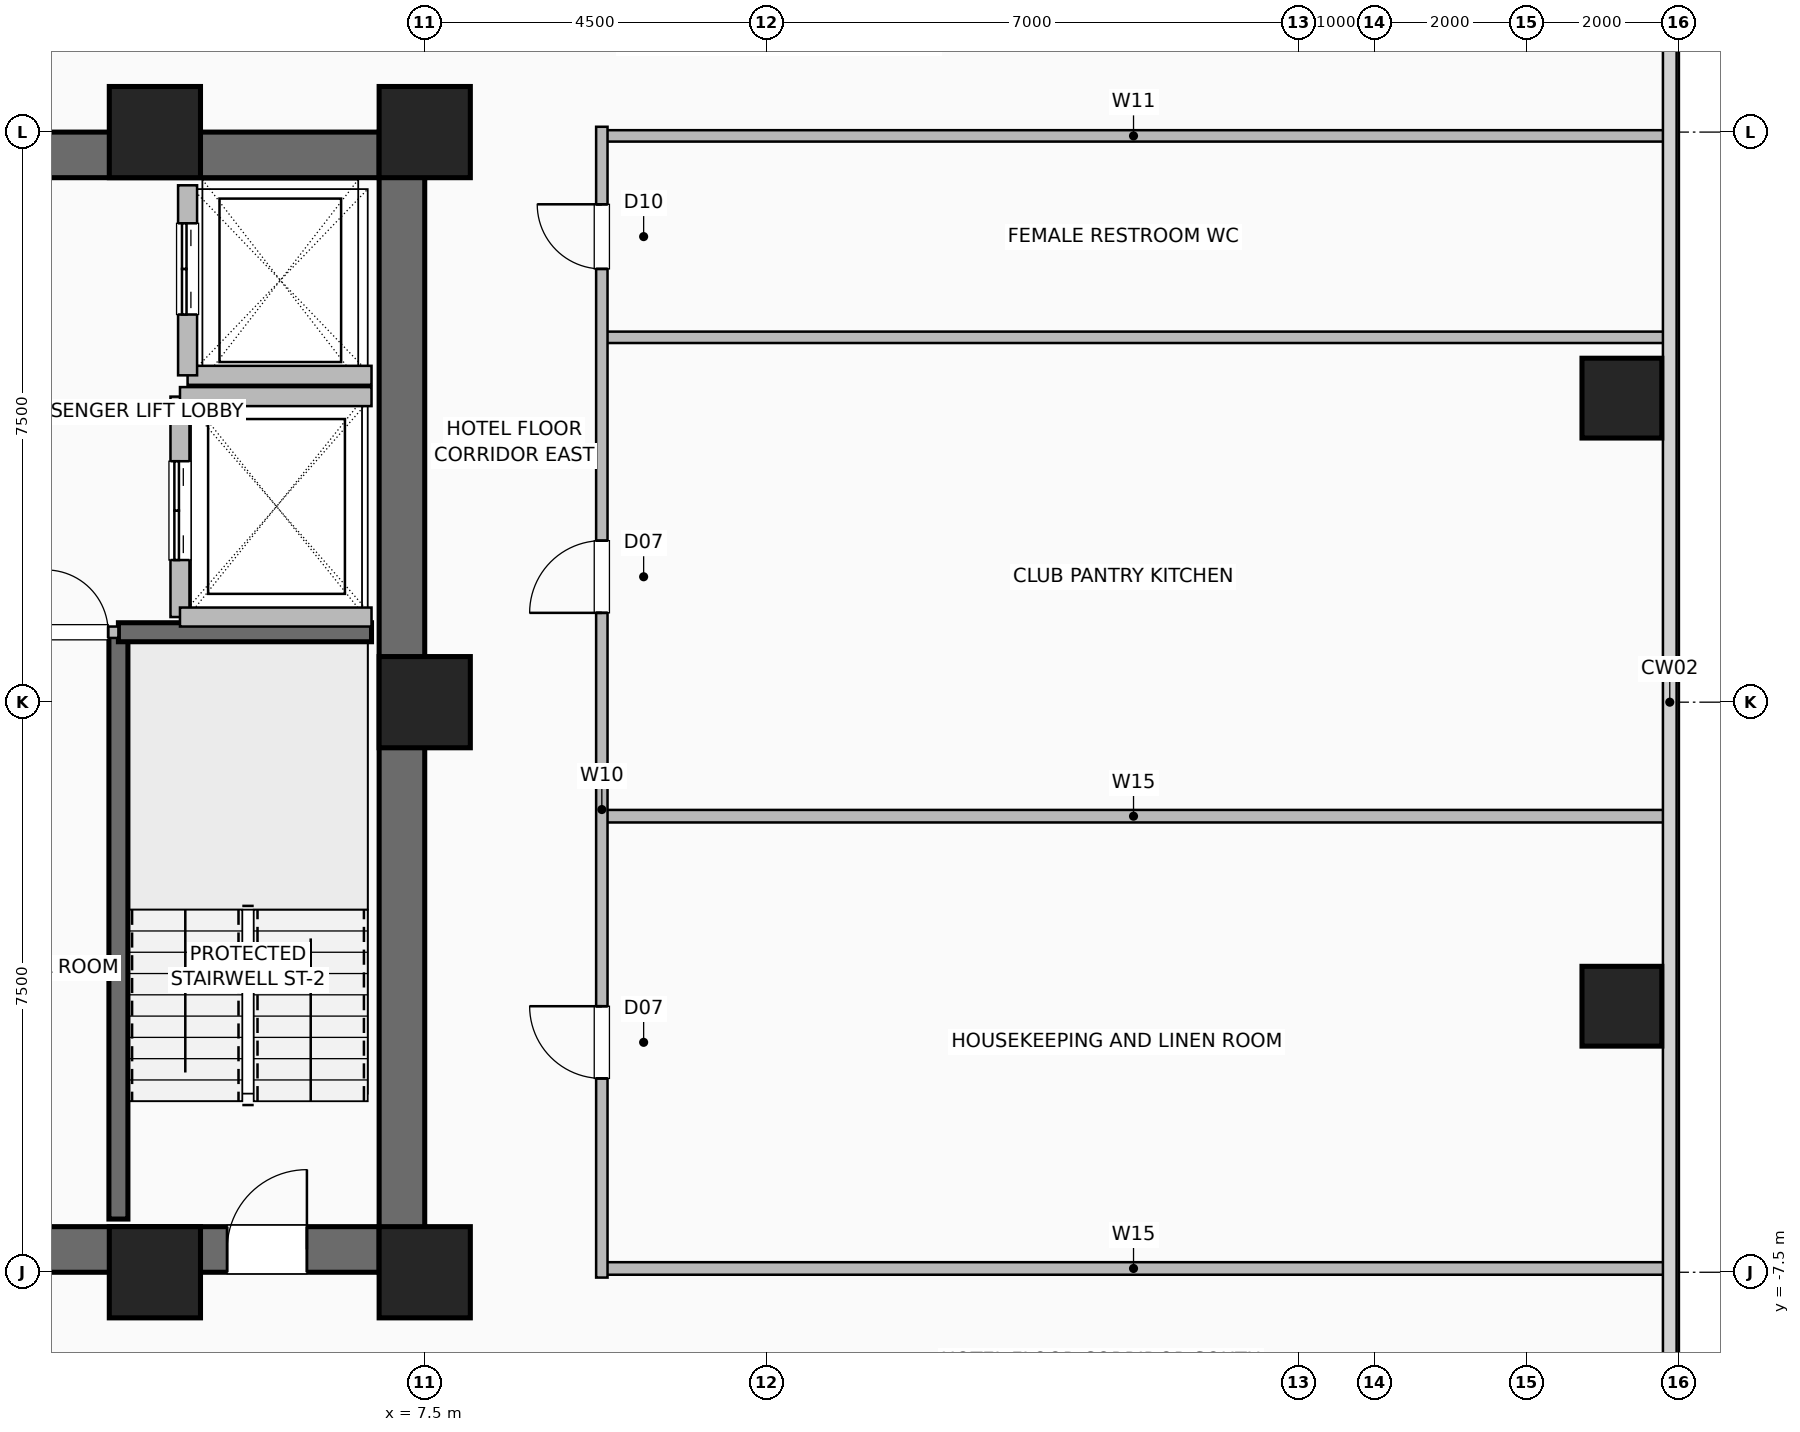
"""IFC4 building model, lengths in metres.
Left out: names, types, materials, properties, quantities, classifications, styles, units other than length and angle.
Written with IfcOpenShell. Run it as: python <this file> out.ifc"""

import sys

from ifc_helpers import new_model, si_unit, direction, frame, frame_2d, origin, origin_2d, place, context, subcontext, project, spatial, rectangle, hollow_rectangle, extrude, element, fill, save


model = new_model("IFC4")
c1 = context("Model", 3, precision=1e-05, world=origin(), true_north=direction((0.0, 1.0)))
c2 = subcontext(c1, "Body", "Model", "MODEL_VIEW")
j1 = project(units=[si_unit("LENGTHUNIT", "METRE"), si_unit("PLANEANGLEUNIT", "RADIAN")], contexts=[c1])
p1 = place(None, origin())
s1 = spatial("IfcSite", under=j1, at=p1, CompositionType="ELEMENT")
p2 = place(p1, origin())
s2 = spatial("IfcBuilding", under=s1, at=p2, CompositionType="ELEMENT")
p3 = place(p2, frame((0.0, 0.0, 65.5)))
s3 = spatial("IfcBuildingStorey", under=s2, at=p3, CompositionType="ELEMENT", Elevation=65.5)
for number, where, z_axis, x_axis in (
    (1, (3.95, -7.5, 0.0), (0.0, 0.0, 1.0), (1.0, 0.0, 0.0)),
    (2, (7.5, -7.5, 0.0), (0.0, 0.0, 1.0), (1.0, 0.0, 0.0)),
    (3, (7.5, 0.0, 0.0), (0.0, 0.0, 1.0), (1.0, 0.0, 0.0)),
    (4, (7.5, 7.5, 0.0), (0.0, 0.0, 1.0), (1.0, 0.0, 0.0)),
    (5, (3.95, 7.5, 0.0), (0.0, 0.0, 1.0), (1.0, 0.0, 0.0)),
):
    element("IfcColumn", number, at=place(p3, frame(where, z_axis=z_axis, x_axis=x_axis)), inside=s3, PredefinedType="COLUMN", context=c2, shape_type="SweptSolid", body=[
        extrude(hollow_rectangle(XDim=1.2, YDim=1.2, WallThickness=0.055, at=origin_2d()), origin(), (0.0, 0.0, 1.0), 3.5),
    ])
for number, where, z_axis, x_axis in (
    (6, (23.25, -4.0, 0.0), (0.0, 0.0, 1.0), (1.0, 0.0, 0.0)),
    (7, (23.25, 4.0, 0.0), (0.0, 0.0, 1.0), (1.0, 0.0, 0.0)),
):
    element("IfcColumn", number, at=place(p3, frame(where, z_axis=z_axis, x_axis=x_axis)), inside=s3, PredefinedType="COLUMN", context=c2, shape_type="SweptSolid", body=[
        extrude(hollow_rectangle(XDim=1.05, YDim=1.05, WallThickness=0.05, at=origin_2d()), origin(), (0.0, 0.0, 1.0), 3.5),
    ])
p4 = place(p3, frame((-7.5, -7.2, 0.0), z_axis=(0.0, 0.0, 1.0), x_axis=(1.0, 0.0, 0.0)))
e8 = element("IfcWall", 8, at=p4, inside=s3, PredefinedType="SHEAR", context=c2, shape_type="SweptSolid", body=[
    extrude(rectangle(XDim=15.0, YDim=0.6, at=frame_2d((7.5, 0.0))), origin(), (0.0, 0.0, 1.0), 3.25),
])
p5 = place(p4, frame((1.55, 0.0, 0.0)))
e9 = element("IfcOpeningElement", 9, at=p5, cuts=e8, PredefinedType="OPENING", context=c2, shape_type="SweptSolid", body=[
    extrude(rectangle(XDim=1.05, YDim=2.08, at=frame_2d((0.525, 1.04))), frame((0.0, 0.31, 0.0), z_axis=(0.0, -1.0, 0.0), x_axis=(1.0, 0.0, 0.0)), (0.0, 0.0, 1.0), 0.62),
])
p6 = place(p4, frame((12.4, 0.0, 0.0)))
e10 = element("IfcOpeningElement", 10, at=p6, cuts=e8, PredefinedType="OPENING", context=c2, shape_type="SweptSolid", body=[
    extrude(rectangle(XDim=1.05, YDim=2.08, at=frame_2d((0.525, 1.04))), frame((0.0, 0.31, 0.0), z_axis=(0.0, -1.0, 0.0), x_axis=(1.0, 0.0, 0.0)), (0.0, 0.0, 1.0), 0.62),
])
p7 = place(p4, frame((4.64, 0.0, 0.0)))
e11 = element("IfcOpeningElement", 11, at=p7, cuts=e8, PredefinedType="OPENING", context=c2, shape_type="SweptSolid", body=[
    extrude(rectangle(XDim=1.1, YDim=2.2, at=frame_2d((0.55, 1.1))), frame((0.0, 0.31, 0.0), z_axis=(0.0, -1.0, 0.0), x_axis=(1.0, 0.0, 0.0)), (0.0, 0.0, 1.0), 0.62),
])
p8 = place(p4, frame((6.52, 0.0, 0.0)))
e12 = element("IfcOpeningElement", 12, at=p8, cuts=e8, PredefinedType="OPENING", context=c2, shape_type="SweptSolid", body=[
    extrude(rectangle(XDim=1.1, YDim=2.2, at=frame_2d((0.55, 1.1))), frame((0.0, 0.31, 0.0), z_axis=(0.0, -1.0, 0.0), x_axis=(1.0, 0.0, 0.0)), (0.0, 0.0, 1.0), 0.62),
])
p9 = place(p4, frame((8.4, 0.0, 0.0)))
e13 = element("IfcOpeningElement", 13, at=p9, cuts=e8, PredefinedType="OPENING", context=c2, shape_type="SweptSolid", body=[
    extrude(rectangle(XDim=1.1, YDim=2.2, at=frame_2d((0.55, 1.1))), frame((0.0, 0.31, 0.0), z_axis=(0.0, -1.0, 0.0), x_axis=(1.0, 0.0, 0.0)), (0.0, 0.0, 1.0), 0.62),
])
for number, where, z_axis, x_axis in (
    (14, (-7.5, 7.2, 0.0), (0.0, 0.0, 1.0), (1.0, 0.0, 0.0)),
    (15, (7.2, -7.5, 0.0), (0.0, 0.0, 1.0), (0.0, 1.0, 0.0)),
):
    element("IfcWall", number, at=place(p3, frame(where, z_axis=z_axis, x_axis=x_axis)), inside=s3, PredefinedType="SHEAR", context=c2, shape_type="SweptSolid", body=[
        extrude(rectangle(XDim=15.0, YDim=0.6, at=frame_2d((7.5, 0.0))), origin(), (0.0, 0.0, 1.0), 3.25),
    ])
p10 = place(p3, frame((3.47, -6.8, 0.0), z_axis=(0.0, 0.0, 1.0), x_axis=(0.0, 1.0, 0.0)))
e16 = element("IfcWall", 16, at=p10, inside=s3, PredefinedType="SHEAR", context=c2, shape_type="SweptSolid", body=[
    extrude(rectangle(XDim=7.72, YDim=0.25, at=frame_2d((3.86, 0.0))), origin(), (0.0, 0.0, 1.0), 3.25),
])
p11 = place(p3, frame((3.47, 0.92, 0.0), z_axis=(0.0, 0.0, 1.0), x_axis=(1.0, 0.0, 0.0)))
e17 = element("IfcWall", 17, at=p11, inside=s3, PredefinedType="SHEAR", context=c2, shape_type="SweptSolid", body=[
    extrude(rectangle(XDim=3.33, YDim=0.25, at=frame_2d((1.665, 0.0))), origin(), (0.0, 0.0, 1.0), 3.25),
])
p12 = place(p3, frame((4.38, 4.3, 0.0), z_axis=(0.0, 0.0, 1.0), x_axis=(1.0, 0.0, 0.0)))
e18 = element("IfcWall", 18, at=p12, inside=s3, PredefinedType="SHEAR", context=c2, shape_type="SweptSolid", body=[
    extrude(rectangle(XDim=2.42, YDim=0.25, at=frame_2d((1.21, 0.0))), origin(), (0.0, 0.0, 1.0), 3.25),
])
p13 = place(p3, frame((4.38, 4.3, 0.0), z_axis=(0.0, 0.0, 1.0), x_axis=(0.0, 1.0, 0.0)))
e19 = element("IfcWall", 19, at=p13, inside=s3, PredefinedType="SHEAR", context=c2, shape_type="SweptSolid", body=[
    extrude(rectangle(XDim=2.5, YDim=0.25, at=frame_2d((1.25, 0.0))), origin(), (0.0, 0.0, 1.0), 3.25),
])
p14 = place(p13, frame((0.8, 0.0, 0.0)))
e20 = element("IfcOpeningElement", 20, at=p14, cuts=e19, PredefinedType="OPENING", context=c2, shape_type="SweptSolid", body=[
    extrude(rectangle(XDim=1.2, YDim=2.2, at=frame_2d((0.6, 1.1))), frame((0.0, 0.135, 0.0), z_axis=(0.0, -1.0, 0.0), x_axis=(1.0, 0.0, 0.0)), (0.0, 0.0, 1.0), 0.27),
])
p15 = place(p3, frame((4.28, 1.12, 0.0), z_axis=(0.0, 0.0, 1.0), x_axis=(0.0, 1.0, 0.0)))
e21 = element("IfcWall", 21, at=p15, inside=s3, PredefinedType="SHEAR", context=c2, shape_type="SweptSolid", body=[
    extrude(rectangle(XDim=2.9, YDim=0.25, at=frame_2d((1.45, 0.0))), origin(), (0.0, 0.0, 1.0), 3.25),
])
p16 = place(p15, frame((0.75, 0.0, 0.0)))
e22 = element("IfcOpeningElement", 22, at=p16, cuts=e21, PredefinedType="OPENING", context=c2, shape_type="SweptSolid", body=[
    extrude(rectangle(XDim=1.3, YDim=2.3, at=frame_2d((0.65, 1.15))), frame((0.0, 0.135, 0.0), z_axis=(0.0, -1.0, 0.0), x_axis=(1.0, 0.0, 0.0)), (0.0, 0.0, 1.0), 0.27),
])
for number, where, z_axis, x_axis in (
    (23, (4.28, 1.12, 0.0), (0.0, 0.0, 1.0), (1.0, 0.0, 0.0)),
    (24, (4.28, 4.02, 0.0), (0.0, 0.0, 1.0), (1.0, 0.0, 0.0)),
):
    element("IfcWall", number, at=place(p3, frame(where, z_axis=z_axis, x_axis=x_axis)), inside=s3, PredefinedType="SHEAR", context=c2, shape_type="SweptSolid", body=[
        extrude(rectangle(XDim=2.52, YDim=0.25, at=frame_2d((1.26, 0.0))), origin(), (0.0, 0.0, 1.0), 3.25),
    ])
p17 = place(p3, frame((2.38, 0.92, 0.0), z_axis=(0.0, 0.0, 1.0), x_axis=(1.0, 0.0, 0.0)))
e25 = element("IfcWall", 25, at=p17, inside=s3, PredefinedType="PARTITIONING", context=c2, shape_type="SweptSolid", body=[
    extrude(rectangle(XDim=1.09, YDim=0.15, at=frame_2d((0.545, 0.0))), origin(), (0.0, 0.0, 1.0), 3.25),
])
p18 = place(p17, frame((0.135, 0.0, 0.0)))
e26 = element("IfcOpeningElement", 26, at=p18, cuts=e25, PredefinedType="OPENING", context=c2, shape_type="SweptSolid", body=[
    extrude(rectangle(XDim=0.82, YDim=2.05, at=frame_2d((0.41, 1.025))), frame((0.0, 0.085, 0.0), z_axis=(0.0, -1.0, 0.0), x_axis=(1.0, 0.0, 0.0)), (0.0, 0.0, 1.0), 0.17),
])
for number, where, z_axis, x_axis in (
    (27, (9.83, -7.45, 0.0), (0.0, 0.0, 1.0), (1.0, 0.0, 0.0)),
    (28, (9.83, -1.5, 0.0), (0.0, 0.0, 1.0), (1.0, 0.0, 0.0)),
):
    element("IfcWall", number, at=place(p3, frame(where, z_axis=z_axis, x_axis=x_axis)), inside=s3, PredefinedType="PLUMBINGWALL", context=c2, shape_type="SweptSolid", body=[
        extrude(rectangle(XDim=13.99, YDim=0.165, at=frame_2d((6.995, 0.0))), origin(), (0.0, 0.0, 1.0), 3.25),
    ])
p19 = place(p3, frame((9.83, 4.8, 0.0), z_axis=(0.0, 0.0, 1.0), x_axis=(1.0, 0.0, 0.0)))
e29 = element("IfcWall", 29, at=p19, inside=s3, PredefinedType="PARTITIONING", context=c2, shape_type="SweptSolid", body=[
    extrude(rectangle(XDim=13.99, YDim=0.15, at=frame_2d((6.995, 0.0))), origin(), (0.0, 0.0, 1.0), 2.818),
])
p20 = place(p3, frame((9.83, 7.45, 0.0), z_axis=(0.0, 0.0, 1.0), x_axis=(1.0, 0.0, 0.0)))
e30 = element("IfcWall", 30, at=p20, inside=s3, PredefinedType="PARTITIONING", context=c2, shape_type="SweptSolid", body=[
    extrude(rectangle(XDim=13.99, YDim=0.15, at=frame_2d((6.995, 0.0))), origin(), (0.0, 0.0, 1.0), 3.25),
])
p21 = place(p3, frame((9.83, -7.57, 0.0), z_axis=(0.0, 0.0, 1.0), x_axis=(0.0, 1.0, 0.0)))
e31 = element("IfcWall", 31, at=p21, inside=s3, PredefinedType="PARTITIONING", context=c2, shape_type="SweptSolid", body=[
    extrude(rectangle(XDim=15.14, YDim=0.15, at=frame_2d((7.57, 0.0))), origin(), (0.0, 0.0, 1.0), 3.25),
])
p22 = place(p21, frame((2.62, 0.0, 0.0)))
e32 = element("IfcOpeningElement", 32, at=p22, cuts=e31, PredefinedType="OPENING", context=c2, shape_type="SweptSolid", body=[
    extrude(rectangle(XDim=0.95, YDim=2.06, at=frame_2d((0.475, 1.03))), frame((0.0, 0.085, 0.0), z_axis=(0.0, -1.0, 0.0), x_axis=(1.0, 0.0, 0.0)), (0.0, 0.0, 1.0), 0.17),
])
p23 = place(p21, frame((8.745, 0.0, 0.0)))
e33 = element("IfcOpeningElement", 33, at=p23, cuts=e31, PredefinedType="OPENING", context=c2, shape_type="SweptSolid", body=[
    extrude(rectangle(XDim=0.95, YDim=2.06, at=frame_2d((0.475, 1.03))), frame((0.0, 0.085, 0.0), z_axis=(0.0, -1.0, 0.0), x_axis=(1.0, 0.0, 0.0)), (0.0, 0.0, 1.0), 0.17),
])
p24 = place(p21, frame((13.27, 0.0, 0.0)))
e34 = element("IfcOpeningElement", 34, at=p24, cuts=e31, PredefinedType="OPENING", context=c2, shape_type="SweptSolid", body=[
    extrude(rectangle(XDim=0.85, YDim=2.05, at=frame_2d((0.425, 1.025))), frame((0.0, 0.085, 0.0), z_axis=(0.0, -1.0, 0.0), x_axis=(1.0, 0.0, 0.0)), (0.0, 0.0, 1.0), 0.17),
])
p25 = place(p6, origin())
e35 = element("IfcDoor", 35, at=p25, inside=s3, OperationType="SINGLE_SWING_RIGHT", PredefinedType="DOOR", context=c2, shape_type="SweptSolid", body=[
    extrude(rectangle(XDim=1.05, YDim=2.08, at=frame_2d((0.525, 1.04))), frame((0.0, 0.025, 0.0), z_axis=(0.0, -1.0, 0.0), x_axis=(1.0, 0.0, 0.0)), (0.0, 0.0, 1.0), 0.05),
])
fill(e10, e35)
p26 = place(p14, origin())
e36 = element("IfcDoor", 36, at=p26, inside=s3, OperationType="DOUBLE_DOOR_SLIDING", PredefinedType="DOOR", context=c2, shape_type="SweptSolid", body=[
    extrude(rectangle(XDim=1.2, YDim=2.2, at=frame_2d((0.6, 1.1))), frame((0.0, 0.025, 0.0), z_axis=(0.0, -1.0, 0.0), x_axis=(1.0, 0.0, 0.0)), (0.0, 0.0, 1.0), 0.05),
])
fill(e20, e36)
p27 = place(p16, origin())
e37 = element("IfcDoor", 37, at=p27, inside=s3, OperationType="DOUBLE_DOOR_SLIDING", PredefinedType="DOOR", context=c2, shape_type="SweptSolid", body=[
    extrude(rectangle(XDim=1.3, YDim=2.3, at=frame_2d((0.65, 1.15))), frame((0.0, 0.025, 0.0), z_axis=(0.0, -1.0, 0.0), x_axis=(1.0, 0.0, 0.0)), (0.0, 0.0, 1.0), 0.05),
])
fill(e22, e37)
p28 = place(p18, origin())
e38 = element("IfcDoor", 38, at=p28, inside=s3, OperationType="SINGLE_SWING_LEFT", PredefinedType="DOOR", context=c2, shape_type="SweptSolid", body=[
    extrude(rectangle(XDim=0.82, YDim=2.05, at=frame_2d((0.41, 1.025))), frame((0.0, 0.025, 0.0), z_axis=(0.0, -1.0, 0.0), x_axis=(1.0, 0.0, 0.0)), (0.0, 0.0, 1.0), 0.05),
])
fill(e26, e38)
p29 = place(p22, origin())
e39 = element("IfcDoor", 39, at=p29, inside=s3, OperationType="SINGLE_SWING_RIGHT", PredefinedType="DOOR", context=c2, shape_type="SweptSolid", body=[
    extrude(rectangle(XDim=0.95, YDim=2.06, at=frame_2d((0.475, 1.03))), frame((0.0, 0.025, 0.0), z_axis=(0.0, -1.0, 0.0), x_axis=(1.0, 0.0, 0.0)), (0.0, 0.0, 1.0), 0.05),
])
fill(e32, e39)
p30 = place(p23, origin())
e40 = element("IfcDoor", 40, at=p30, inside=s3, OperationType="SINGLE_SWING_LEFT", PredefinedType="DOOR", context=c2, shape_type="SweptSolid", body=[
    extrude(rectangle(XDim=0.95, YDim=2.06, at=frame_2d((0.475, 1.03))), frame((0.0, 0.025, 0.0), z_axis=(0.0, -1.0, 0.0), x_axis=(1.0, 0.0, 0.0)), (0.0, 0.0, 1.0), 0.05),
])
fill(e33, e40)
p31 = place(p24, origin())
e41 = element("IfcDoor", 41, at=p31, inside=s3, OperationType="SINGLE_SWING_RIGHT", PredefinedType="DOOR", context=c2, shape_type="SweptSolid", body=[
    extrude(rectangle(XDim=0.85, YDim=2.05, at=frame_2d((0.425, 1.025))), frame((0.0, 0.025, 0.0), z_axis=(0.0, -1.0, 0.0), x_axis=(1.0, 0.0, 0.0)), (0.0, 0.0, 1.0), 0.05),
])
fill(e34, e41)
save(model, sys.argv[1])
